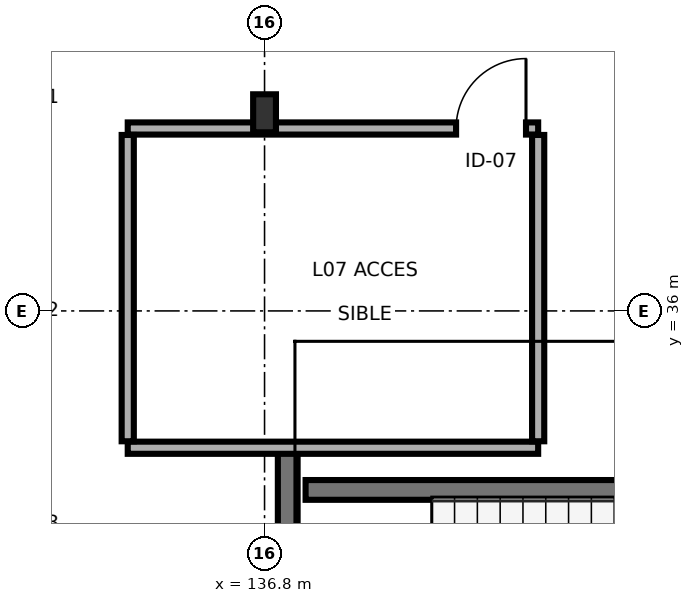
"""IFC4 building model, lengths in metres.
Left out: names, types, materials, properties, quantities, classifications, styles, units other than length and angle.
Written with IfcOpenShell. Run it as: python <this file> out.ifc"""

import sys

from ifc_helpers import new_model, si_unit, direction, frame, frame_2d, origin, origin_2d, place, context, subcontext, project, spatial, rectangle, i_section, extrude, element, fill, save


model = new_model("IFC4")
c1 = context("Model", 3, precision=1e-05, world=origin(), true_north=direction((0.0, 1.0)))
c2 = subcontext(c1, "Body", "Model", "MODEL_VIEW")
j1 = project(units=[si_unit("LENGTHUNIT", "METRE"), si_unit("PLANEANGLEUNIT", "RADIAN")], contexts=[c1])
p1 = place(None, origin())
s1 = spatial("IfcSite", under=j1, at=p1, CompositionType="ELEMENT")
p2 = place(p1, origin())
s2 = spatial("IfcBuilding", under=s1, at=p2, CompositionType="ELEMENT")
p3 = place(p2, frame((0.0, 0.0, 24.9)))
s3 = spatial("IfcBuildingStorey", under=s2, at=p3, CompositionType="ELEMENT", Elevation=24.9)
p4 = place(p3, frame((136.8, 38.6, 0.0), z_axis=(0.0, 0.0, 1.0), x_axis=(1.0, 0.0, 0.0)))
e1 = element("IfcColumn", 1, at=p4, inside=s3, PredefinedType="COLUMN", context=c2, shape_type="SweptSolid", body=[
    extrude(i_section(OverallWidth=0.3, OverallDepth=0.5, WebThickness=0.014, FlangeThickness=0.028, FilletRadius=0.027, at=origin_2d()), origin(), (0.0, 0.0, 1.0), 3.4),
])
p5 = place(p3, frame((137.105, 29.54, 0.0), z_axis=(0.0, 0.0, 1.0), x_axis=(0.0, 1.0, 0.0)))
e2 = element("IfcWall", 2, at=p5, inside=s3, PredefinedType="SHEAR", context=c2, shape_type="SweptSolid", body=[
    extrude(rectangle(XDim=4.635, YDim=0.26, at=frame_2d((2.317, 0.0))), origin(), (0.0, 0.0, 1.0), 3.19),
])
p6 = place(p5, frame((0.61, 0.0, 0.0)))
e3 = element("IfcOpeningElement", 3, at=p6, cuts=e2, PredefinedType="OPENING", context=c2, shape_type="SweptSolid", body=[
    extrude(rectangle(XDim=1.1, YDim=2.2, at=frame_2d((0.55, 1.1))), frame((0.0, 0.14, 0.0), z_axis=(0.0, -1.0, 0.0), x_axis=(1.0, 0.0, 0.0)), (0.0, 0.0, 1.0), 0.28),
])
p7 = place(p3, frame((137.34, 33.645, 0.0), z_axis=(0.0, 0.0, 1.0), x_axis=(1.0, 0.0, 0.0)))
e4 = element("IfcWall", 4, at=p7, inside=s3, PredefinedType="SHEAR", context=c2, shape_type="SweptSolid", body=[
    extrude(rectangle(XDim=8.52, YDim=0.26, at=frame_2d((4.26, 0.0))), origin(), (0.0, 0.0, 1.0), 3.19),
])
p8 = place(p3, frame((135.0, 34.2, 0.0), z_axis=(0.0, 0.0, 1.0), x_axis=(1.0, 0.0, 0.0)))
e5 = element("IfcWall", 5, at=p8, inside=s3, PredefinedType="PARTITIONING", context=c2, shape_type="SweptSolid", body=[
    extrude(rectangle(XDim=5.4, YDim=0.16, at=frame_2d((2.7, 0.0))), origin(), (0.0, 0.0, 1.0), 2.725),
])
p9 = place(p3, frame((135.0, 38.4, 0.0), z_axis=(0.0, 0.0, 1.0), x_axis=(1.0, 0.0, 0.0)))
e6 = element("IfcWall", 6, at=p9, inside=s3, PredefinedType="PARTITIONING", context=c2, shape_type="SweptSolid", body=[
    extrude(rectangle(XDim=5.4, YDim=0.16, at=frame_2d((2.7, 0.0))), origin(), (0.0, 0.0, 1.0), 2.725),
])
p10 = place(p9, frame((4.32, 0.0, 0.0)))
e7 = element("IfcOpeningElement", 7, at=p10, cuts=e6, PredefinedType="OPENING", context=c2, shape_type="SweptSolid", body=[
    extrude(rectangle(XDim=0.92, YDim=2.1, at=frame_2d((0.46, 1.05))), frame((0.0, 0.09, 0.0), z_axis=(0.0, -1.0, 0.0), x_axis=(1.0, 0.0, 0.0)), (0.0, 0.0, 1.0), 0.18),
])
p11 = place(p3, frame((135.0, 34.285, 0.0), z_axis=(0.0, 0.0, 1.0), x_axis=(0.0, 1.0, 0.0)))
e8 = element("IfcWall", 8, at=p11, inside=s3, PredefinedType="PARTITIONING", context=c2, shape_type="SweptSolid", body=[
    extrude(rectangle(XDim=4.03, YDim=0.16, at=frame_2d((2.015, 0.0))), origin(), (0.0, 0.0, 1.0), 2.725),
])
p12 = place(p3, frame((140.4, 34.285, 0.0), z_axis=(0.0, 0.0, 1.0), x_axis=(0.0, 1.0, 0.0)))
e9 = element("IfcWall", 9, at=p12, inside=s3, PredefinedType="PARTITIONING", context=c2, shape_type="SweptSolid", body=[
    extrude(rectangle(XDim=4.03, YDim=0.16, at=frame_2d((2.015, 0.0))), origin(), (0.0, 0.0, 1.0), 3.19),
])
p13 = place(p10, origin())
e10 = element("IfcDoor", 10, at=p13, inside=s3, OperationType="SINGLE_SWING_RIGHT", PredefinedType="DOOR", context=c2, shape_type="SweptSolid", body=[
    extrude(rectangle(XDim=0.92, YDim=2.1, at=frame_2d((0.46, 1.05))), frame((0.0, 0.025, 0.0), z_axis=(0.0, -1.0, 0.0), x_axis=(1.0, 0.0, 0.0)), (0.0, 0.0, 1.0), 0.05),
])
fill(e7, e10)
save(model, sys.argv[1])
